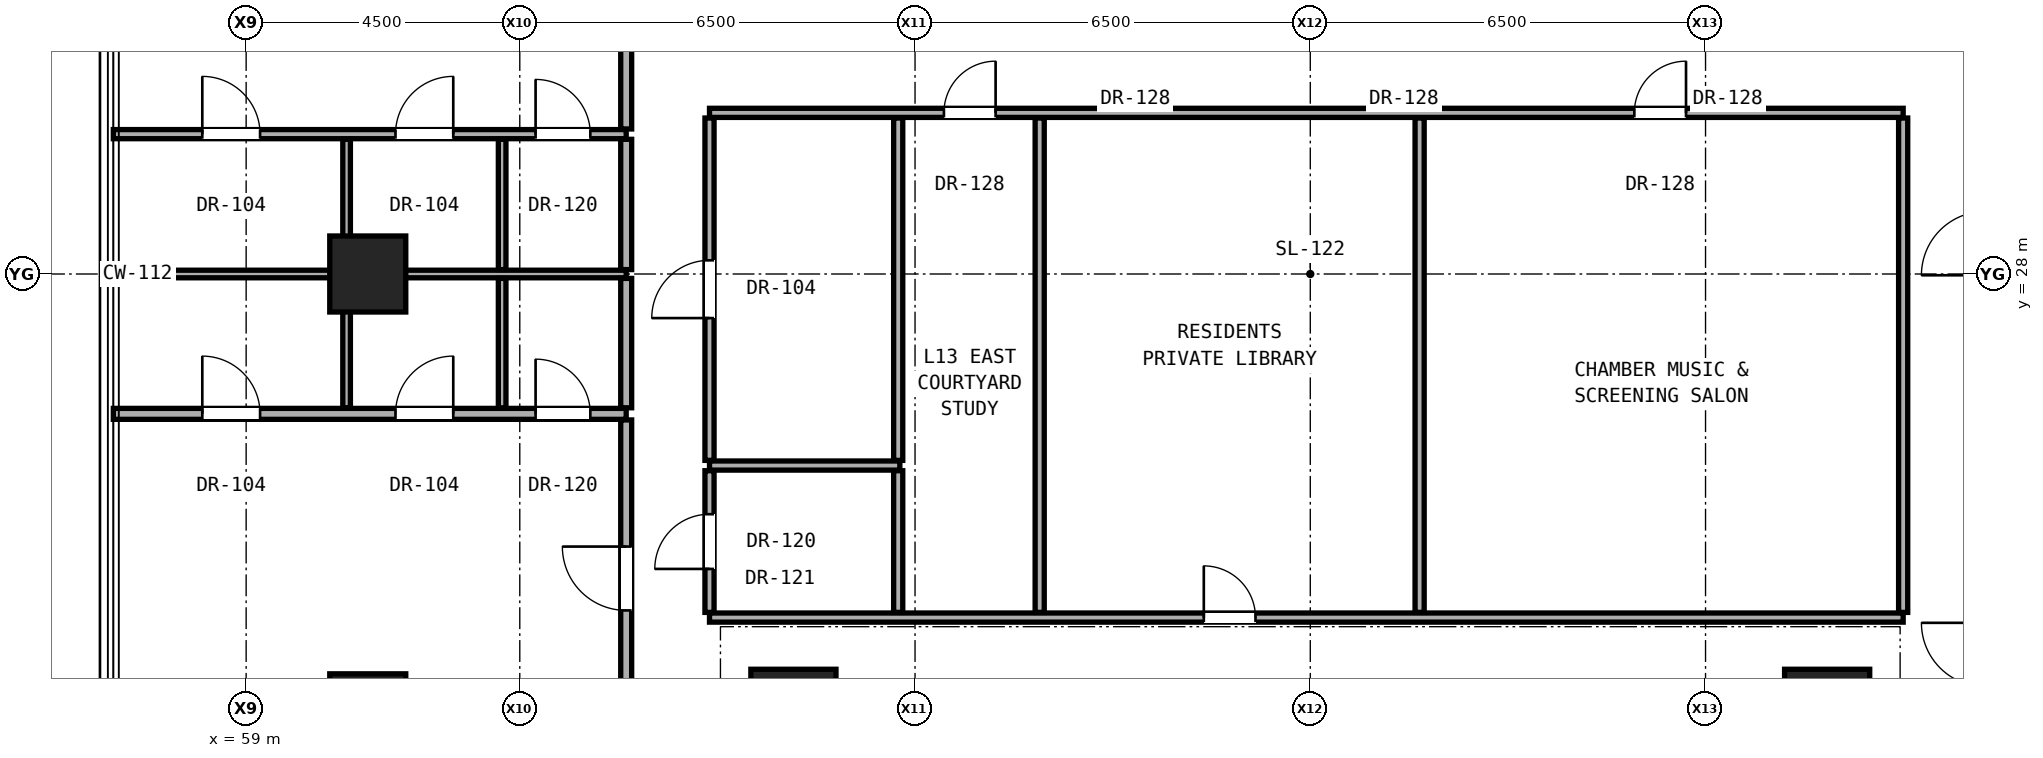
"""IFC4 building model, lengths in metres.
Left out: names, types, materials, properties, quantities, classifications, styles, units other than length and angle.
Written with IfcOpenShell. Run it as: python <this file> out.ifc"""

import sys

from ifc_helpers import new_model, si_unit, direction, frame, frame_2d, origin, origin_2d, place, context, subcontext, project, spatial, rectangle, hollow_rectangle, extrude, element, fill, save


model = new_model("IFC4")
c1 = context("Model", 3, precision=1e-05, world=origin(), true_north=direction((0.0, 1.0)))
c2 = subcontext(c1, "Body", "Model", "MODEL_VIEW")
j1 = project(units=[si_unit("LENGTHUNIT", "METRE"), si_unit("PLANEANGLEUNIT", "RADIAN")], contexts=[c1])
p1 = place(None, origin())
s1 = spatial("IfcSite", under=j1, at=p1, CompositionType="ELEMENT")
p2 = place(p1, origin())
s2 = spatial("IfcBuilding", under=s1, at=p2, CompositionType="ELEMENT")
p3 = place(p2, frame((0.0, 0.0, 48.8)))
s3 = spatial("IfcBuildingStorey", under=s2, at=p3, CompositionType="ELEMENT", Elevation=48.8)
for number, where, z_axis, x_axis in (
    (1, (68.0, 20.8, 0.0), (0.0, 0.0, 1.0), (1.0, 0.0, 0.0)),
    (2, (85.0, 20.8, 0.0), (0.0, 0.0, 1.0), (1.0, 0.0, 0.0)),
):
    element("IfcColumn", number, at=place(p3, frame(where, z_axis=z_axis, x_axis=x_axis)), inside=s3, PredefinedType="COLUMN", context=c2, shape_type="SweptSolid", body=[
        extrude(rectangle(XDim=1.4, YDim=1.4, at=origin_2d()), origin(), (0.0, 0.0, 1.0), 3.3),
    ])
for number, where, z_axis, x_axis in (
    (3, (61.0, 20.8, 0.0), (0.0, 0.0, 1.0), (1.0, 0.0, 0.0)),
    (4, (61.0, 28.0, 0.0), (0.0, 0.0, 1.0), (1.0, 0.0, 0.0)),
):
    element("IfcColumn", number, at=place(p3, frame(where, z_axis=z_axis, x_axis=x_axis)), inside=s3, PredefinedType="COLUMN", context=c2, shape_type="SweptSolid", body=[
        extrude(hollow_rectangle(XDim=1.25, YDim=1.25, WallThickness=0.07, at=origin_2d()), origin(), (0.0, 0.0, 1.0), 3.3),
    ])
p4 = place(p3, frame((66.62, 22.35, 0.0), z_axis=(0.0, 0.0, 1.0), x_axis=(1.0, 0.0, 0.0)))
e5 = element("IfcWall", 5, at=p4, inside=s3, PredefinedType="PARTITIONING", context=c2, shape_type="SweptSolid", body=[
    extrude(rectangle(XDim=19.63, YDim=0.15, at=frame_2d((9.815, 0.0))), origin(), (0.0, 0.0, 1.0), 2.125),
])
p5 = place(p4, frame((8.129, 0.0, 0.0)))
e6 = element("IfcOpeningElement", 6, at=p5, cuts=e5, PredefinedType="OPENING", context=c2, shape_type="SweptSolid", body=[
    extrude(rectangle(XDim=0.85, YDim=2.01, at=frame_2d((0.425, 1.005))), frame((0.0, 0.085, 0.0), z_axis=(0.0, -1.0, 0.0), x_axis=(1.0, 0.0, 0.0)), (0.0, 0.0, 1.0), 0.17),
])
p6 = place(p3, frame((66.62, 24.85, 0.0), z_axis=(0.0, 0.0, 1.0), x_axis=(1.0, 0.0, 0.0)))
e7 = element("IfcWall", 7, at=p6, inside=s3, PredefinedType="PARTITIONING", context=c2, shape_type="SweptSolid", body=[
    extrude(rectangle(XDim=3.13, YDim=0.15, at=frame_2d((1.565, 0.0))), origin(), (0.0, 0.0, 1.0), 2.125),
])
p7 = place(p3, frame((56.816, 25.7, 0.0), z_axis=(0.0, 0.0, 1.0), x_axis=(1.0, 0.0, 0.0)))
e8 = element("IfcWall", 8, at=p7, inside=s3, PredefinedType="PARTITIONING", context=c2, shape_type="SweptSolid", body=[
    extrude(rectangle(XDim=8.434, YDim=0.18, at=frame_2d((4.217, 0.0))), origin(), (0.0, 0.0, 1.0), 2.196),
])
p8 = place(p7, frame((1.463, 0.0, 0.0)))
e9 = element("IfcOpeningElement", 9, at=p8, cuts=e8, PredefinedType="OPENING", context=c2, shape_type="SweptSolid", body=[
    extrude(rectangle(XDim=0.95, YDim=2.15, at=frame_2d((0.475, 1.075))), frame((0.0, 0.1, 0.0), z_axis=(0.0, -1.0, 0.0), x_axis=(1.0, 0.0, 0.0)), (0.0, 0.0, 1.0), 0.2),
])
p9 = place(p7, frame((4.64, 0.0, 0.0)))
e10 = element("IfcOpeningElement", 10, at=p9, cuts=e8, PredefinedType="OPENING", context=c2, shape_type="SweptSolid", body=[
    extrude(rectangle(XDim=0.95, YDim=2.15, at=frame_2d((0.475, 1.075))), frame((0.0, 0.1, 0.0), z_axis=(0.0, -1.0, 0.0), x_axis=(1.0, 0.0, 0.0)), (0.0, 0.0, 1.0), 0.2),
])
p10 = place(p7, frame((6.944, 0.0, 0.0)))
e11 = element("IfcOpeningElement", 11, at=p10, cuts=e8, PredefinedType="OPENING", context=c2, shape_type="SweptSolid", body=[
    extrude(rectangle(XDim=0.9, YDim=2.1, at=frame_2d((0.45, 1.05))), frame((0.0, 0.1, 0.0), z_axis=(0.0, -1.0, 0.0), x_axis=(1.0, 0.0, 0.0)), (0.0, 0.0, 1.0), 0.2),
])
p11 = place(p3, frame((56.816, 28.0, 0.0), z_axis=(0.0, 0.0, 1.0), x_axis=(1.0, 0.0, 0.0)))
e12 = element("IfcWall", 12, at=p11, inside=s3, PredefinedType="PARTITIONING", context=c2, shape_type="SweptSolid", body=[
    extrude(rectangle(XDim=8.434, YDim=0.125, at=frame_2d((4.217, 0.0))), origin(), (0.0, 0.0, 1.0), 2.196),
])
p12 = place(p3, frame((56.816, 30.3, 0.0), z_axis=(0.0, 0.0, 1.0), x_axis=(1.0, 0.0, 0.0)))
e13 = element("IfcWall", 13, at=p12, inside=s3, PredefinedType="PARTITIONING", context=c2, shape_type="SweptSolid", body=[
    extrude(rectangle(XDim=8.434, YDim=0.15, at=frame_2d((4.217, 0.0))), origin(), (0.0, 0.0, 1.0), 2.196),
])
p13 = place(p12, frame((1.463, 0.0, 0.0)))
e14 = element("IfcOpeningElement", 14, at=p13, cuts=e13, PredefinedType="OPENING", context=c2, shape_type="SweptSolid", body=[
    extrude(rectangle(XDim=0.95, YDim=2.15, at=frame_2d((0.475, 1.075))), frame((0.0, 0.085, 0.0), z_axis=(0.0, -1.0, 0.0), x_axis=(1.0, 0.0, 0.0)), (0.0, 0.0, 1.0), 0.17),
])
p14 = place(p12, frame((4.64, 0.0, 0.0)))
e15 = element("IfcOpeningElement", 15, at=p14, cuts=e13, PredefinedType="OPENING", context=c2, shape_type="SweptSolid", body=[
    extrude(rectangle(XDim=0.95, YDim=2.15, at=frame_2d((0.475, 1.075))), frame((0.0, 0.085, 0.0), z_axis=(0.0, -1.0, 0.0), x_axis=(1.0, 0.0, 0.0)), (0.0, 0.0, 1.0), 0.17),
])
p15 = place(p12, frame((6.944, 0.0, 0.0)))
e16 = element("IfcOpeningElement", 16, at=p15, cuts=e13, PredefinedType="OPENING", context=c2, shape_type="SweptSolid", body=[
    extrude(rectangle(XDim=0.9, YDim=2.1, at=frame_2d((0.45, 1.05))), frame((0.0, 0.085, 0.0), z_axis=(0.0, -1.0, 0.0), x_axis=(1.0, 0.0, 0.0)), (0.0, 0.0, 1.0), 0.17),
])
p16 = place(p3, frame((66.62, 30.65, 0.0), z_axis=(0.0, 0.0, 1.0), x_axis=(1.0, 0.0, 0.0)))
e17 = element("IfcWall", 17, at=p16, inside=s3, PredefinedType="PARTITIONING", context=c2, shape_type="SweptSolid", body=[
    extrude(rectangle(XDim=19.63, YDim=0.15, at=frame_2d((9.815, 0.0))), origin(), (0.0, 0.0, 1.0), 2.125),
])
p17 = place(p16, frame((3.855, 0.0, 0.0)))
e18 = element("IfcOpeningElement", 18, at=p17, cuts=e17, PredefinedType="OPENING", context=c2, shape_type="SweptSolid", body=[
    extrude(rectangle(XDim=0.85, YDim=2.01, at=frame_2d((0.425, 1.005))), frame((0.0, 0.085, 0.0), z_axis=(0.0, -1.0, 0.0), x_axis=(1.0, 0.0, 0.0)), (0.0, 0.0, 1.0), 0.17),
])
p18 = place(p16, frame((15.209, 0.0, 0.0)))
e19 = element("IfcOpeningElement", 19, at=p18, cuts=e17, PredefinedType="OPENING", context=c2, shape_type="SweptSolid", body=[
    extrude(rectangle(XDim=0.85, YDim=2.01, at=frame_2d((0.425, 1.005))), frame((0.0, 0.085, 0.0), z_axis=(0.0, -1.0, 0.0), x_axis=(1.0, 0.0, 0.0)), (0.0, 0.0, 1.0), 0.17),
])
p19 = place(p3, frame((60.652, 25.8, 0.0), z_axis=(0.0, 0.0, 1.0), x_axis=(0.0, 1.0, 0.0)))
e20 = element("IfcWall", 20, at=p19, inside=s3, PredefinedType="PARTITIONING", context=c2, shape_type="SweptSolid", body=[
    extrude(rectangle(XDim=2.127, YDim=0.125, at=frame_2d((1.064, 0.0))), origin(), (0.0, 0.0, 1.0), 3.06),
])
p20 = place(p3, frame((60.652, 28.073, 0.0), z_axis=(0.0, 0.0, 1.0), x_axis=(0.0, 1.0, 0.0)))
e21 = element("IfcWall", 21, at=p20, inside=s3, PredefinedType="PARTITIONING", context=c2, shape_type="SweptSolid", body=[
    extrude(rectangle(XDim=2.143, YDim=0.125, at=frame_2d((1.071, 0.0))), origin(), (0.0, 0.0, 1.0), 3.06),
])
p21 = place(p3, frame((63.21, 25.8, 0.0), z_axis=(0.0, 0.0, 1.0), x_axis=(0.0, 1.0, 0.0)))
e22 = element("IfcWall", 22, at=p21, inside=s3, PredefinedType="PARTITIONING", context=c2, shape_type="SweptSolid", body=[
    extrude(rectangle(XDim=2.127, YDim=0.125, at=frame_2d((1.064, 0.0))), origin(), (0.0, 0.0, 1.0), 2.279),
])
p22 = place(p3, frame((63.21, 28.073, 0.0), z_axis=(0.0, 0.0, 1.0), x_axis=(0.0, 1.0, 0.0)))
e23 = element("IfcWall", 23, at=p22, inside=s3, PredefinedType="PARTITIONING", context=c2, shape_type="SweptSolid", body=[
    extrude(rectangle(XDim=2.143, YDim=0.125, at=frame_2d((1.071, 0.0))), origin(), (0.0, 0.0, 1.0), 2.279),
])
p23 = place(p3, frame((65.25, 20.385, 0.0), z_axis=(0.0, 0.0, 1.0), x_axis=(0.0, 1.0, 0.0)))
e24 = element("IfcWall", 24, at=p23, inside=s3, PredefinedType="PARTITIONING", context=c2, shape_type="SweptSolid", body=[
    extrude(rectangle(XDim=5.215, YDim=0.18, at=frame_2d((2.607, 0.0))), origin(), (0.0, 0.0, 1.0), 2.452),
])
p24 = place(p23, frame((2.083, 0.0, 0.0)))
e25 = element("IfcOpeningElement", 25, at=p24, cuts=e24, PredefinedType="OPENING", context=c2, shape_type="SweptSolid", body=[
    extrude(rectangle(XDim=1.05, YDim=2.2, at=frame_2d((0.525, 1.1))), frame((0.0, 0.1, 0.0), z_axis=(0.0, -1.0, 0.0), x_axis=(1.0, 0.0, 0.0)), (0.0, 0.0, 1.0), 0.2),
])
p25 = place(p3, frame((65.25, 25.8, 0.0), z_axis=(0.0, 0.0, 1.0), x_axis=(0.0, 1.0, 0.0)))
e26 = element("IfcWall", 26, at=p25, inside=s3, PredefinedType="PARTITIONING", context=c2, shape_type="SweptSolid", body=[
    extrude(rectangle(XDim=2.127, YDim=0.18, at=frame_2d((1.064, 0.0))), origin(), (0.0, 0.0, 1.0), 2.279),
])
p26 = place(p3, frame((65.25, 28.073, 0.0), z_axis=(0.0, 0.0, 1.0), x_axis=(0.0, 1.0, 0.0)))
e27 = element("IfcWall", 27, at=p26, inside=s3, PredefinedType="PARTITIONING", context=c2, shape_type="SweptSolid", body=[
    extrude(rectangle(XDim=2.143, YDim=0.18, at=frame_2d((1.071, 0.0))), origin(), (0.0, 0.0, 1.0), 2.279),
])
p27 = place(p3, frame((65.25, 30.385, 0.0), z_axis=(0.0, 0.0, 1.0), x_axis=(0.0, 1.0, 0.0)))
e28 = element("IfcWall", 28, at=p27, inside=s3, PredefinedType="PARTITIONING", context=c2, shape_type="SweptSolid", body=[
    extrude(rectangle(XDim=5.23, YDim=0.18, at=frame_2d((2.615, 0.0))), origin(), (0.0, 0.0, 1.0), 2.452),
])
p28 = place(p27, frame((2.09, 0.0, 0.0)))
e29 = element("IfcOpeningElement", 29, at=p28, cuts=e28, PredefinedType="OPENING", context=c2, shape_type="SweptSolid", body=[
    extrude(rectangle(XDim=1.05, YDim=2.2, at=frame_2d((0.525, 1.1))), frame((0.0, 0.1, 0.0), z_axis=(0.0, -1.0, 0.0), x_axis=(1.0, 0.0, 0.0)), (0.0, 0.0, 1.0), 0.2),
])
p29 = place(p3, frame((66.62, 22.435, 0.0), z_axis=(0.0, 0.0, 1.0), x_axis=(0.0, 1.0, 0.0)))
e30 = element("IfcWall", 30, at=p29, inside=s3, PredefinedType="PARTITIONING", context=c2, shape_type="SweptSolid", body=[
    extrude(rectangle(XDim=2.33, YDim=0.15, at=frame_2d((1.165, 0.0))), origin(), (0.0, 0.0, 1.0), 3.06),
])
p30 = place(p29, frame((0.715, 0.0, 0.0)))
e31 = element("IfcOpeningElement", 31, at=p30, cuts=e30, PredefinedType="OPENING", context=c2, shape_type="SweptSolid", body=[
    extrude(rectangle(XDim=0.9, YDim=2.1, at=frame_2d((0.45, 1.05))), frame((0.0, 0.085, 0.0), z_axis=(0.0, -1.0, 0.0), x_axis=(1.0, 0.0, 0.0)), (0.0, 0.0, 1.0), 0.17),
])
p31 = place(p3, frame((66.62, 24.935, 0.0), z_axis=(0.0, 0.0, 1.0), x_axis=(0.0, 1.0, 0.0)))
e32 = element("IfcWall", 32, at=p31, inside=s3, PredefinedType="PARTITIONING", context=c2, shape_type="SweptSolid", body=[
    extrude(rectangle(XDim=5.63, YDim=0.15, at=frame_2d((2.815, 0.0))), origin(), (0.0, 0.0, 1.0), 2.279),
])
p32 = place(p31, frame((2.34, 0.0, 0.0)))
e33 = element("IfcOpeningElement", 33, at=p32, cuts=e32, PredefinedType="OPENING", context=c2, shape_type="SweptSolid", body=[
    extrude(rectangle(XDim=0.95, YDim=2.15, at=frame_2d((0.475, 1.075))), frame((0.0, 0.085, 0.0), z_axis=(0.0, -1.0, 0.0), x_axis=(1.0, 0.0, 0.0)), (0.0, 0.0, 1.0), 0.17),
])
p33 = place(p3, frame((69.723, 22.435, 0.0), z_axis=(0.0, 0.0, 1.0), x_axis=(0.0, 1.0, 0.0)))
e34 = element("IfcWall", 34, at=p33, inside=s3, PredefinedType="PARTITIONING", context=c2, shape_type="SweptSolid", body=[
    extrude(rectangle(XDim=2.33, YDim=0.15, at=frame_2d((1.165, 0.0))), origin(), (0.0, 0.0, 1.0), 3.06),
])
p34 = place(p3, frame((69.723, 24.935, 0.0), z_axis=(0.0, 0.0, 1.0), x_axis=(0.0, 1.0, 0.0)))
e35 = element("IfcWall", 35, at=p34, inside=s3, PredefinedType="PARTITIONING", context=c2, shape_type="SweptSolid", body=[
    extrude(rectangle(XDim=5.63, YDim=0.15, at=frame_2d((2.815, 0.0))), origin(), (0.0, 0.0, 1.0), 2.125),
])
for number, where, z_axis, x_axis in (
    (36, (72.05, 22.435, 0.0), (0.0, 0.0, 1.0), (0.0, 1.0, 0.0)),
    (37, (78.298, 22.435, 0.0), (0.0, 0.0, 1.0), (0.0, 1.0, 0.0)),
):
    element("IfcWall", number, at=place(p3, frame(where, z_axis=z_axis, x_axis=x_axis)), inside=s3, PredefinedType="PARTITIONING", context=c2, shape_type="SweptSolid", body=[
        extrude(rectangle(XDim=8.13, YDim=0.15, at=frame_2d((4.065, 0.0))), origin(), (0.0, 0.0, 1.0), 2.125),
    ])
p35 = place(p3, frame((86.25, 22.435, 0.0), z_axis=(0.0, 0.0, 1.0), x_axis=(0.0, 1.0, 0.0)))
e38 = element("IfcWall", 38, at=p35, inside=s3, PredefinedType="PARTITIONING", context=c2, shape_type="SweptSolid", body=[
    extrude(rectangle(XDim=8.13, YDim=0.15, at=frame_2d((4.065, 0.0))), origin(), (0.0, 0.0, 1.0), 2.279),
])
p36 = place(p30, origin())
e39 = element("IfcDoor", 39, at=p36, inside=s3, OperationType="SINGLE_SWING_LEFT", PredefinedType="DOOR", context=c2, shape_type="SweptSolid", body=[
    extrude(rectangle(XDim=0.9, YDim=2.1, at=frame_2d((0.45, 1.05))), frame((0.0, 0.025, 0.0), z_axis=(0.0, -1.0, 0.0), x_axis=(1.0, 0.0, 0.0)), (0.0, 0.0, 1.0), 0.05),
])
fill(e31, e39)
p37 = place(p24, origin())
e40 = element("IfcDoor", 40, at=p37, inside=s3, OperationType="SINGLE_SWING_RIGHT", PredefinedType="DOOR", context=c2, shape_type="SweptSolid", body=[
    extrude(rectangle(XDim=1.05, YDim=2.2, at=frame_2d((0.525, 1.1))), frame((0.0, 0.025, 0.0), z_axis=(0.0, -1.0, 0.0), x_axis=(1.0, 0.0, 0.0)), (0.0, 0.0, 1.0), 0.05),
])
fill(e25, e40)
p38 = place(p8, origin())
e41 = element("IfcDoor", 41, at=p38, inside=s3, OperationType="SINGLE_SWING_LEFT", PredefinedType="DOOR", context=c2, shape_type="SweptSolid", body=[
    extrude(rectangle(XDim=0.95, YDim=2.15, at=frame_2d((0.475, 1.075))), frame((0.0, 0.025, 0.0), z_axis=(0.0, -1.0, 0.0), x_axis=(1.0, 0.0, 0.0)), (0.0, 0.0, 1.0), 0.05),
])
fill(e9, e41)
p39 = place(p9, origin())
e42 = element("IfcDoor", 42, at=p39, inside=s3, OperationType="SINGLE_SWING_RIGHT", PredefinedType="DOOR", context=c2, shape_type="SweptSolid", body=[
    extrude(rectangle(XDim=0.95, YDim=2.15, at=frame_2d((0.475, 1.075))), frame((0.0, 0.025, 0.0), z_axis=(0.0, -1.0, 0.0), x_axis=(1.0, 0.0, 0.0)), (0.0, 0.0, 1.0), 0.05),
])
fill(e10, e42)
p40 = place(p10, origin())
e43 = element("IfcDoor", 43, at=p40, inside=s3, OperationType="SINGLE_SWING_LEFT", PredefinedType="DOOR", context=c2, shape_type="SweptSolid", body=[
    extrude(rectangle(XDim=0.9, YDim=2.1, at=frame_2d((0.45, 1.05))), frame((0.0, 0.025, 0.0), z_axis=(0.0, -1.0, 0.0), x_axis=(1.0, 0.0, 0.0)), (0.0, 0.0, 1.0), 0.05),
])
fill(e11, e43)
p41 = place(p13, origin())
e44 = element("IfcDoor", 44, at=p41, inside=s3, OperationType="SINGLE_SWING_LEFT", PredefinedType="DOOR", context=c2, shape_type="SweptSolid", body=[
    extrude(rectangle(XDim=0.95, YDim=2.15, at=frame_2d((0.475, 1.075))), frame((0.0, 0.025, 0.0), z_axis=(0.0, -1.0, 0.0), x_axis=(1.0, 0.0, 0.0)), (0.0, 0.0, 1.0), 0.05),
])
fill(e14, e44)
p42 = place(p14, origin())
e45 = element("IfcDoor", 45, at=p42, inside=s3, OperationType="SINGLE_SWING_RIGHT", PredefinedType="DOOR", context=c2, shape_type="SweptSolid", body=[
    extrude(rectangle(XDim=0.95, YDim=2.15, at=frame_2d((0.475, 1.075))), frame((0.0, 0.025, 0.0), z_axis=(0.0, -1.0, 0.0), x_axis=(1.0, 0.0, 0.0)), (0.0, 0.0, 1.0), 0.05),
])
fill(e15, e45)
p43 = place(p15, origin())
e46 = element("IfcDoor", 46, at=p43, inside=s3, OperationType="SINGLE_SWING_LEFT", PredefinedType="DOOR", context=c2, shape_type="SweptSolid", body=[
    extrude(rectangle(XDim=0.9, YDim=2.1, at=frame_2d((0.45, 1.05))), frame((0.0, 0.025, 0.0), z_axis=(0.0, -1.0, 0.0), x_axis=(1.0, 0.0, 0.0)), (0.0, 0.0, 1.0), 0.05),
])
fill(e16, e46)
p44 = place(p32, origin())
e47 = element("IfcDoor", 47, at=p44, inside=s3, OperationType="SINGLE_SWING_LEFT", PredefinedType="DOOR", context=c2, shape_type="SweptSolid", body=[
    extrude(rectangle(XDim=0.95, YDim=2.15, at=frame_2d((0.475, 1.075))), frame((0.0, 0.025, 0.0), z_axis=(0.0, -1.0, 0.0), x_axis=(1.0, 0.0, 0.0)), (0.0, 0.0, 1.0), 0.05),
])
fill(e33, e47)
p45 = place(p17, origin())
e48 = element("IfcDoor", 48, at=p45, inside=s3, OperationType="SINGLE_SWING_RIGHT", PredefinedType="DOOR", context=c2, shape_type="SweptSolid", body=[
    extrude(rectangle(XDim=0.85, YDim=2.01, at=frame_2d((0.425, 1.005))), frame((0.0, 0.025, 0.0), z_axis=(0.0, -1.0, 0.0), x_axis=(1.0, 0.0, 0.0)), (0.0, 0.0, 1.0), 0.05),
])
fill(e18, e48)
p46 = place(p5, origin())
e49 = element("IfcDoor", 49, at=p46, inside=s3, OperationType="SINGLE_SWING_LEFT", PredefinedType="DOOR", context=c2, shape_type="SweptSolid", body=[
    extrude(rectangle(XDim=0.85, YDim=2.01, at=frame_2d((0.425, 1.005))), frame((0.0, 0.025, 0.0), z_axis=(0.0, -1.0, 0.0), x_axis=(1.0, 0.0, 0.0)), (0.0, 0.0, 1.0), 0.05),
])
fill(e6, e49)
p47 = place(p18, origin())
e50 = element("IfcDoor", 50, at=p47, inside=s3, OperationType="SINGLE_SWING_RIGHT", PredefinedType="DOOR", context=c2, shape_type="SweptSolid", body=[
    extrude(rectangle(XDim=0.85, YDim=2.01, at=frame_2d((0.425, 1.005))), frame((0.0, 0.025, 0.0), z_axis=(0.0, -1.0, 0.0), x_axis=(1.0, 0.0, 0.0)), (0.0, 0.0, 1.0), 0.05),
])
fill(e19, e50)
save(model, sys.argv[1])
